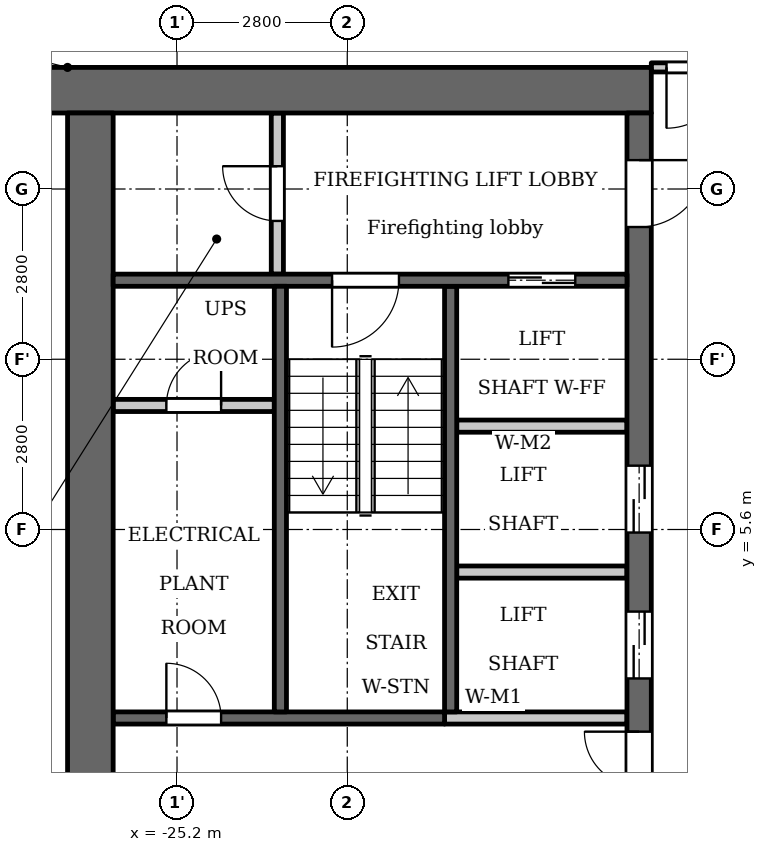
"""IFC4 building model, lengths in metres.
Left out: names, types, materials, properties, quantities, classifications, styles, units other than length and angle.
Written with IfcOpenShell. Run it as: python <this file> out.ifc"""

import sys

from ifc_helpers import new_model, si_unit, direction, frame, frame_2d, origin, place, context, subcontext, project, spatial, rectangle, extrude, element, fill, save


model = new_model("IFC4")
c1 = context("Model", 3, precision=1e-05, world=origin(), true_north=direction((0.0, 1.0)))
c2 = subcontext(c1, "Body", "Model", "MODEL_VIEW")
j1 = project(units=[si_unit("LENGTHUNIT", "METRE"), si_unit("PLANEANGLEUNIT", "RADIAN")], contexts=[c1])
p1 = place(None, origin())
s1 = spatial("IfcSite", under=j1, at=p1, CompositionType="ELEMENT")
p2 = place(p1, origin())
s2 = spatial("IfcBuilding", under=s1, at=p2, CompositionType="ELEMENT")
p3 = place(p2, frame((0.0, 0.0, 143.1)))
s3 = spatial("IfcBuildingStorey", under=s2, at=p3, CompositionType="ELEMENT", Elevation=143.1)
p4 = place(p3, frame((-20.7, 2.6, 0.0), z_axis=(0.0, 0.0, 1.0), x_axis=(0.0, 1.0, 0.0)))
e1 = element("IfcWall", 1, at=p4, inside=s3, PredefinedType="SHEAR", context=c2, shape_type="SweptSolid", body=[
    extrude(rectangle(XDim=7.0, YDim=0.2, at=frame_2d((3.5, 0.0))), origin(), (0.0, 0.0, 1.0), 3.2),
])
p5 = place(p3, frame((-20.8, 2.5, 0.0), z_axis=(0.0, 0.0, 1.0), x_axis=(-1.0, 0.0, 0.0)))
e2 = element("IfcWall", 2, at=p5, inside=s3, PredefinedType="SHEAR", context=c2, shape_type="SweptSolid", body=[
    extrude(rectangle(XDim=5.45, YDim=0.2, at=frame_2d((2.725, 0.0))), origin(), (0.0, 0.0, 1.0), 3.2),
])
p6 = place(p5, frame((3.675, 0.0, 0.0)))
e3 = element("IfcOpeningElement", 3, at=p6, cuts=e2, PredefinedType="OPENING", context=c2, shape_type="SweptSolid", body=[
    extrude(rectangle(XDim=0.9, YDim=2.1, at=frame_2d((0.45, 1.05))), frame((0.0, 0.11, 0.0), z_axis=(0.0, -1.0, 0.0), x_axis=(1.0, 0.0, 0.0)), (0.0, 0.0, 1.0), 0.22),
])
p7 = place(p3, frame((-17.4, 12.825, 0.0), z_axis=(0.0, 0.0, 1.0), x_axis=(-1.0, 0.0, 0.0)))
e4 = element("IfcWall", 4, at=p7, inside=s3, PredefinedType="SHEAR", context=c2, shape_type="SweptSolid", body=[
    extrude(rectangle(XDim=10.4, YDim=0.75, at=frame_2d((5.2, 0.0))), origin(), (0.0, 0.0, 1.0), 3.2),
])
p8 = place(p3, frame((-17.6, -12.45, 0.0), z_axis=(0.0, 0.0, 1.0), x_axis=(0.0, 1.0, 0.0)))
e5 = element("IfcWall", 5, at=p8, inside=s3, PredefinedType="SHEAR", context=c2, shape_type="SweptSolid", body=[
    extrude(rectangle(XDim=24.9, YDim=0.4, at=frame_2d((12.45, 0.0))), origin(), (0.0, 0.0, 1.0), 3.2),
])
p9 = place(p8, frame((8.65, 0.0, 0.0)))
e6 = element("IfcOpeningElement", 6, at=p9, cuts=e5, PredefinedType="OPENING", context=c2, shape_type="SweptSolid", body=[
    extrude(rectangle(XDim=0.9, YDim=2.1, at=frame_2d((0.45, 1.05))), frame((0.0, 0.21, 0.0), z_axis=(0.0, -1.0, 0.0), x_axis=(1.0, 0.0, 0.0)), (0.0, 0.0, 1.0), 0.42),
])
p10 = place(p8, frame((15.6, 0.0, 0.0)))
e7 = element("IfcOpeningElement", 7, at=p10, cuts=e5, PredefinedType="OPENING", context=c2, shape_type="SweptSolid", body=[
    extrude(rectangle(XDim=1.1, YDim=2.1, at=frame_2d((0.55, 1.05))), frame((0.0, 0.21, 0.0), z_axis=(0.0, -1.0, 0.0), x_axis=(1.0, 0.0, 0.0)), (0.0, 0.0, 1.0), 0.42),
])
p11 = place(p8, frame((18.0, 0.0, 0.0)))
e8 = element("IfcOpeningElement", 8, at=p11, cuts=e5, PredefinedType="OPENING", context=c2, shape_type="SweptSolid", body=[
    extrude(rectangle(XDim=1.1, YDim=2.1, at=frame_2d((0.55, 1.05))), frame((0.0, 0.21, 0.0), z_axis=(0.0, -1.0, 0.0), x_axis=(1.0, 0.0, 0.0)), (0.0, 0.0, 1.0), 0.42),
])
p12 = place(p8, frame((23.025, 0.0, 0.0)))
e9 = element("IfcOpeningElement", 9, at=p12, cuts=e5, PredefinedType="OPENING", context=c2, shape_type="SweptSolid", body=[
    extrude(rectangle(XDim=1.1, YDim=2.1, at=frame_2d((0.55, 1.05))), frame((0.0, 0.21, 0.0), z_axis=(0.0, -1.0, 0.0), x_axis=(1.0, 0.0, 0.0)), (0.0, 0.0, 1.0), 0.42),
])
p13 = place(p8, frame((0.775, 0.0, 0.0)))
e10 = element("IfcOpeningElement", 10, at=p13, cuts=e5, PredefinedType="OPENING", context=c2, shape_type="SweptSolid", body=[
    extrude(rectangle(XDim=1.1, YDim=2.1, at=frame_2d((0.55, 1.05))), frame((0.0, 0.21, 0.0), z_axis=(0.0, -1.0, 0.0), x_axis=(1.0, 0.0, 0.0)), (0.0, 0.0, 1.0), 0.42),
])
p14 = place(p8, frame((12.925, 0.0, 0.0)))
e11 = element("IfcOpeningElement", 11, at=p14, cuts=e5, PredefinedType="OPENING", context=c2, shape_type="SweptSolid", body=[
    extrude(rectangle(XDim=1.8, YDim=2.1, at=frame_2d((0.9, 1.05))), frame((0.0, 0.21, 0.0), z_axis=(0.0, -1.0, 0.0), x_axis=(1.0, 0.0, 0.0)), (0.0, 0.0, 1.0), 0.42),
])
p15 = place(p3, frame((-26.625, -12.45, 0.0), z_axis=(0.0, 0.0, 1.0), x_axis=(0.0, 1.0, 0.0)))
e12 = element("IfcWall", 12, at=p15, inside=s3, PredefinedType="SHEAR", context=c2, shape_type="SweptSolid", body=[
    extrude(rectangle(XDim=24.9, YDim=0.75, at=frame_2d((12.45, 0.0))), origin(), (0.0, 0.0, 1.0), 3.2),
])
p16 = place(p3, frame((-23.55, 9.8, 0.0), z_axis=(0.0, 0.0, 1.0), x_axis=(0.0, 1.0, 0.0)))
e13 = element("IfcWall", 13, at=p16, inside=s3, PredefinedType="PARTITIONING", context=c2, shape_type="SweptSolid", body=[
    extrude(rectangle(XDim=2.65, YDim=0.2, at=frame_2d((1.325, 0.0))), origin(), (0.0, 0.0, 1.0), 3.2),
])
p17 = place(p16, frame((0.875, 0.0, 0.0)))
e14 = element("IfcOpeningElement", 14, at=p17, cuts=e13, PredefinedType="OPENING", context=c2, shape_type="SweptSolid", body=[
    extrude(rectangle(XDim=0.9, YDim=2.1, at=frame_2d((0.45, 1.05))), frame((0.0, 0.11, 0.0), z_axis=(0.0, -1.0, 0.0), x_axis=(1.0, 0.0, 0.0)), (0.0, 0.0, 1.0), 0.22),
])
p18 = place(p3, frame((-23.6, 7.64, 0.0), z_axis=(0.0, 0.0, 1.0), x_axis=(-1.0, 0.0, 0.0)))
e15 = element("IfcWall", 15, at=p18, inside=s3, PredefinedType="PARTITIONING", context=c2, shape_type="SweptSolid", body=[
    extrude(rectangle(XDim=2.65, YDim=0.2, at=frame_2d((1.325, 0.0))), origin(), (0.0, 0.0, 1.0), 3.2),
])
p19 = place(p18, frame((0.875, 0.0, 0.0)))
e16 = element("IfcOpeningElement", 16, at=p19, cuts=e15, PredefinedType="OPENING", context=c2, shape_type="SweptSolid", body=[
    extrude(rectangle(XDim=0.9, YDim=2.1, at=frame_2d((0.45, 1.05))), frame((0.0, 0.11, 0.0), z_axis=(0.0, -1.0, 0.0), x_axis=(1.0, 0.0, 0.0)), (0.0, 0.0, 1.0), 0.22),
])
p20 = place(p3, frame((-17.8, 2.5, 0.0), z_axis=(0.0, 0.0, 1.0), x_axis=(-1.0, 0.0, 0.0)))
e17 = element("IfcWall", 17, at=p20, inside=s3, PredefinedType="PARTITIONING", context=c2, shape_type="SweptSolid", body=[
    extrude(rectangle(XDim=3.0, YDim=0.2, at=frame_2d((1.5, 0.0))), origin(), (0.0, 0.0, 1.0), 3.2),
])
for number, where, z_axis, x_axis in (
    (18, (-17.8, 4.9, 0.0), (0.0, 0.0, 1.0), (-1.0, 0.0, 0.0)),
    (19, (-17.8, 7.3, 0.0), (0.0, 0.0, 1.0), (-1.0, 0.0, 0.0)),
):
    element("IfcWall", number, at=place(p3, frame(where, z_axis=z_axis, x_axis=x_axis)), inside=s3, PredefinedType="PARTITIONING", context=c2, shape_type="SweptSolid", body=[
        extrude(rectangle(XDim=2.8, YDim=0.2, at=frame_2d((1.4, 0.0))), origin(), (0.0, 0.0, 1.0), 3.2),
    ])
p21 = place(p3, frame((-17.8, 9.7, 0.0), z_axis=(0.0, 0.0, 1.0), x_axis=(-1.0, 0.0, 0.0)))
e20 = element("IfcWall", 20, at=p21, inside=s3, PredefinedType="SHEAR", context=c2, shape_type="SweptSolid", body=[
    extrude(rectangle(XDim=8.45, YDim=0.2, at=frame_2d((4.225, 0.0))), origin(), (0.0, 0.0, 1.0), 3.2),
])
p22 = place(p21, frame((0.85, 0.0, 0.0)))
e21 = element("IfcOpeningElement", 21, at=p22, cuts=e20, PredefinedType="OPENING", context=c2, shape_type="SweptSolid", body=[
    extrude(rectangle(XDim=1.1, YDim=2.1, at=frame_2d((0.55, 1.05))), frame((0.0, 0.11, 0.0), z_axis=(0.0, -1.0, 0.0), x_axis=(1.0, 0.0, 0.0)), (0.0, 0.0, 1.0), 0.22),
])
p23 = place(p21, frame((3.75, 0.0, 0.0)))
e22 = element("IfcOpeningElement", 22, at=p23, cuts=e20, PredefinedType="OPENING", context=c2, shape_type="SweptSolid", body=[
    extrude(rectangle(XDim=1.1, YDim=2.1, at=frame_2d((0.55, 1.05))), frame((0.0, 0.11, 0.0), z_axis=(0.0, -1.0, 0.0), x_axis=(1.0, 0.0, 0.0)), (0.0, 0.0, 1.0), 0.22),
])
p24 = place(p3, frame((-23.5, 2.6, 0.0), z_axis=(0.0, 0.0, 1.0), x_axis=(0.0, 1.0, 0.0)))
e23 = element("IfcWall", 23, at=p24, inside=s3, PredefinedType="SHEAR", context=c2, shape_type="SweptSolid", body=[
    extrude(rectangle(XDim=7.0, YDim=0.2, at=frame_2d((3.5, 0.0))), origin(), (0.0, 0.0, 1.0), 3.2),
])
p25 = place(p3, frame((-17.4, 13.2, 0.0), z_axis=(0.0, 0.0, 1.0), x_axis=(1.0, 0.0, 0.0)))
e24 = element("IfcWall", 24, at=p25, inside=s3, PredefinedType="PARTITIONING", context=c2, shape_type="SweptSolid", body=[
    extrude(rectangle(XDim=34.8, YDim=0.15, at=frame_2d((17.4, 0.0))), origin(), (0.0, 0.0, 1.0), 3.2),
])
p26 = place(p25, frame((0.25, 0.0, 0.0)))
e25 = element("IfcOpeningElement", 25, at=p26, cuts=e24, PredefinedType="OPENING", context=c2, shape_type="SweptSolid", body=[
    extrude(rectangle(XDim=1.0, YDim=2.1, at=frame_2d((0.5, 1.05))), frame((0.0, 0.085, 0.0), z_axis=(0.0, -1.0, 0.0), x_axis=(1.0, 0.0, 0.0)), (0.0, 0.0, 1.0), 0.17),
])
p27 = place(p25, frame((33.65, 0.0, 0.0)))
e26 = element("IfcOpeningElement", 26, at=p27, cuts=e24, PredefinedType="OPENING", context=c2, shape_type="SweptSolid", body=[
    extrude(rectangle(XDim=1.0, YDim=2.1, at=frame_2d((0.5, 1.05))), frame((0.0, 0.085, 0.0), z_axis=(0.0, -1.0, 0.0), x_axis=(1.0, 0.0, 0.0)), (0.0, 0.0, 1.0), 0.17),
])
p28 = place(p25, frame((15.75, 0.0, 0.0)))
e27 = element("IfcOpeningElement", 27, at=p28, cuts=e24, PredefinedType="OPENING", context=c2, shape_type="SweptSolid", body=[
    extrude(rectangle(XDim=1.0, YDim=2.1, at=frame_2d((0.5, 1.05))), frame((0.0, 0.085, 0.0), z_axis=(0.0, -1.0, 0.0), x_axis=(1.0, 0.0, 0.0)), (0.0, 0.0, 1.0), 0.17),
])
p29 = place(p25, frame((19.35, 0.0, 0.0)))
e28 = element("IfcOpeningElement", 28, at=p29, cuts=e24, PredefinedType="OPENING", context=c2, shape_type="SweptSolid", body=[
    extrude(rectangle(XDim=1.0, YDim=2.1, at=frame_2d((0.5, 1.05))), frame((0.0, 0.085, 0.0), z_axis=(0.0, -1.0, 0.0), x_axis=(1.0, 0.0, 0.0)), (0.0, 0.0, 1.0), 0.17),
])
p30 = place(p25, frame((26.95, 0.0, 0.0)))
e29 = element("IfcOpeningElement", 29, at=p30, cuts=e24, PredefinedType="OPENING", context=c2, shape_type="SweptSolid", body=[
    extrude(rectangle(XDim=1.0, YDim=2.1, at=frame_2d((0.5, 1.05))), frame((0.0, 0.085, 0.0), z_axis=(0.0, -1.0, 0.0), x_axis=(1.0, 0.0, 0.0)), (0.0, 0.0, 1.0), 0.17),
])
p31 = place(p25, frame((29.75, 0.0, 0.0)))
e30 = element("IfcOpeningElement", 30, at=p31, cuts=e24, PredefinedType="OPENING", context=c2, shape_type="SweptSolid", body=[
    extrude(rectangle(XDim=1.0, YDim=2.1, at=frame_2d((0.5, 1.05))), frame((0.0, 0.085, 0.0), z_axis=(0.0, -1.0, 0.0), x_axis=(1.0, 0.0, 0.0)), (0.0, 0.0, 1.0), 0.17),
])
p32 = place(p10, origin())
e31 = element("IfcDoor", 31, at=p32, inside=s3, OperationType="DOUBLE_DOOR_SLIDING", PredefinedType="DOOR", context=c2, shape_type="SweptSolid", body=[
    extrude(rectangle(XDim=1.1, YDim=2.1, at=frame_2d((0.55, 1.05))), frame((0.0, 0.025, 0.0), z_axis=(0.0, -1.0, 0.0), x_axis=(1.0, 0.0, 0.0)), (0.0, 0.0, 1.0), 0.05),
])
fill(e7, e31)
p33 = place(p11, origin())
e32 = element("IfcDoor", 32, at=p33, inside=s3, OperationType="DOUBLE_DOOR_SLIDING", PredefinedType="DOOR", context=c2, shape_type="SweptSolid", body=[
    extrude(rectangle(XDim=1.1, YDim=2.1, at=frame_2d((0.55, 1.05))), frame((0.0, 0.025, 0.0), z_axis=(0.0, -1.0, 0.0), x_axis=(1.0, 0.0, 0.0)), (0.0, 0.0, 1.0), 0.05),
])
fill(e8, e32)
p34 = place(p22, origin())
e33 = element("IfcDoor", 33, at=p34, inside=s3, OperationType="DOUBLE_DOOR_SLIDING", PredefinedType="DOOR", context=c2, shape_type="SweptSolid", body=[
    extrude(rectangle(XDim=1.1, YDim=2.1, at=frame_2d((0.55, 1.05))), frame((0.0, 0.025, 0.0), z_axis=(0.0, -1.0, 0.0), x_axis=(1.0, 0.0, 0.0)), (0.0, 0.0, 1.0), 0.05),
])
fill(e21, e33)
p35 = place(p12, origin())
e34 = element("IfcDoor", 34, at=p35, inside=s3, OperationType="SINGLE_SWING_RIGHT", PredefinedType="DOOR", context=c2, shape_type="SweptSolid", body=[
    extrude(rectangle(XDim=1.1, YDim=2.1, at=frame_2d((0.55, 1.05))), frame((0.0, 0.025, 0.0), z_axis=(0.0, -1.0, 0.0), x_axis=(1.0, 0.0, 0.0)), (0.0, 0.0, 1.0), 0.05),
])
fill(e9, e34)
p36 = place(p17, origin())
e35 = element("IfcDoor", 35, at=p36, inside=s3, OperationType="SINGLE_SWING_LEFT", PredefinedType="DOOR", context=c2, shape_type="SweptSolid", body=[
    extrude(rectangle(XDim=0.9, YDim=2.1, at=frame_2d((0.45, 1.05))), frame((0.0, 0.025, 0.0), z_axis=(0.0, -1.0, 0.0), x_axis=(1.0, 0.0, 0.0)), (0.0, 0.0, 1.0), 0.05),
])
fill(e14, e35)
p37 = place(p23, origin())
e36 = element("IfcDoor", 36, at=p37, inside=s3, OperationType="SINGLE_SWING_LEFT", PredefinedType="DOOR", context=c2, shape_type="SweptSolid", body=[
    extrude(rectangle(XDim=1.1, YDim=2.1, at=frame_2d((0.55, 1.05))), frame((0.0, 0.025, 0.0), z_axis=(0.0, -1.0, 0.0), x_axis=(1.0, 0.0, 0.0)), (0.0, 0.0, 1.0), 0.05),
])
fill(e22, e36)
p38 = place(p14, origin())
e37 = element("IfcDoor", 37, at=p38, inside=s3, OperationType="DOUBLE_DOOR_SINGLE_SWING", PredefinedType="DOOR", context=c2, shape_type="SweptSolid", body=[
    extrude(rectangle(XDim=1.8, YDim=2.1, at=frame_2d((0.9, 1.05))), frame((0.0, 0.025, 0.0), z_axis=(0.0, -1.0, 0.0), x_axis=(1.0, 0.0, 0.0)), (0.0, 0.0, 1.0), 0.05),
])
fill(e11, e37)
p39 = place(p19, origin())
e38 = element("IfcDoor", 38, at=p39, inside=s3, OperationType="SINGLE_SWING_LEFT", PredefinedType="DOOR", context=c2, shape_type="SweptSolid", body=[
    extrude(rectangle(XDim=0.9, YDim=2.1, at=frame_2d((0.45, 1.05))), frame((0.0, 0.025, 0.0), z_axis=(0.0, -1.0, 0.0), x_axis=(1.0, 0.0, 0.0)), (0.0, 0.0, 1.0), 0.05),
])
fill(e16, e38)
p40 = place(p6, origin())
e39 = element("IfcDoor", 39, at=p40, inside=s3, OperationType="SINGLE_SWING_RIGHT", PredefinedType="DOOR", context=c2, shape_type="SweptSolid", body=[
    extrude(rectangle(XDim=0.9, YDim=2.1, at=frame_2d((0.45, 1.05))), frame((0.0, 0.025, 0.0), z_axis=(0.0, -1.0, 0.0), x_axis=(1.0, 0.0, 0.0)), (0.0, 0.0, 1.0), 0.05),
])
fill(e3, e39)
p41 = place(p26, origin())
e40 = element("IfcDoor", 40, at=p41, inside=s3, OperationType="SINGLE_SWING_LEFT", PredefinedType="DOOR", context=c2, shape_type="SweptSolid", body=[
    extrude(rectangle(XDim=1.0, YDim=2.1, at=frame_2d((0.5, 1.05))), frame((0.0, 0.025, 0.0), z_axis=(0.0, -1.0, 0.0), x_axis=(1.0, 0.0, 0.0)), (0.0, 0.0, 1.0), 0.05),
])
fill(e25, e40)
save(model, sys.argv[1])
